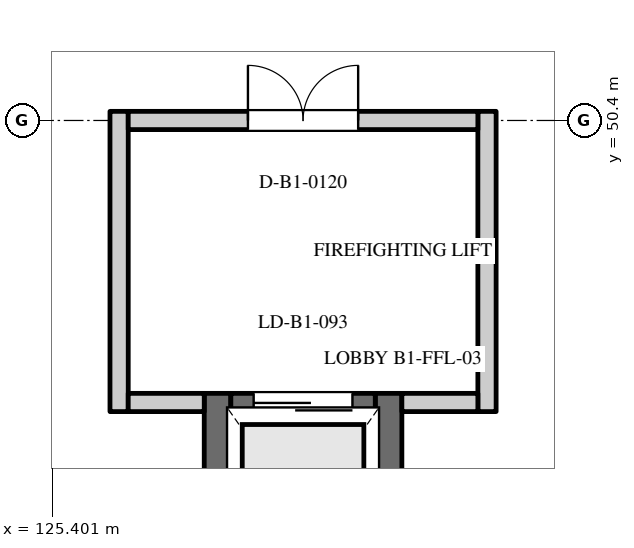
"""IFC4 building model, lengths in metres.
Left out: names, types, materials, properties, quantities, classifications, styles, units other than length and angle.
Written with IfcOpenShell. Run it as: python <this file> out.ifc"""

import sys

from ifc_helpers import new_model, si_unit, direction, frame, frame_2d, origin, place, context, subcontext, project, spatial, rectangle, extrude, element, fill, save


model = new_model("IFC4")
c1 = context("Model", 3, precision=1e-05, world=origin(), true_north=direction((0.0, 1.0)))
c2 = subcontext(c1, "Body", "Model", "MODEL_VIEW")
j1 = project(units=[si_unit("LENGTHUNIT", "METRE"), si_unit("PLANEANGLEUNIT", "RADIAN")], contexts=[c1])
p1 = place(None, origin())
s1 = spatial("IfcSite", under=j1, at=p1, CompositionType="ELEMENT")
p2 = place(p1, origin())
s2 = spatial("IfcBuilding", under=s1, at=p2, CompositionType="ELEMENT")
p3 = place(p2, frame((0.0, 0.0, -4.5)))
s3 = spatial("IfcBuildingStorey", under=s2, at=p3, CompositionType="ELEMENT", Elevation=-4.5)
for number, where, z_axis, x_axis in (
    (1, (127.575, 43.06, 0.0), (0.0, 0.0, 1.0), (0.0, 1.0, 0.0)),
    (2, (129.825, 43.06, 0.0), (0.0, 0.0, 1.0), (0.0, 1.0, 0.0)),
):
    element("IfcWall", number, at=place(p3, frame(where, z_axis=z_axis, x_axis=x_axis)), inside=s3, PredefinedType="SHEAR", context=c2, shape_type="SweptSolid", body=[
        extrude(rectangle(XDim=3.75, YDim=0.35, at=frame_2d((1.875, 0.0))), origin(), (0.0, 0.0, 1.0), 4.5),
    ])
p4 = place(p3, frame((127.75, 46.635, 0.0), z_axis=(0.0, 0.0, 1.0), x_axis=(1.0, 0.0, 0.0)))
e3 = element("IfcWall", 3, at=p4, inside=s3, PredefinedType="SHEAR", context=c2, shape_type="SweptSolid", body=[
    extrude(rectangle(XDim=1.9, YDim=0.35, at=frame_2d((0.95, 0.0))), origin(), (0.0, 0.0, 1.0), 4.15),
])
p5 = place(p4, frame((0.3, 0.0, 0.0)))
e4 = element("IfcOpeningElement", 4, at=p5, cuts=e3, PredefinedType="OPENING", context=c2, shape_type="SweptSolid", body=[
    extrude(rectangle(XDim=1.3, YDim=2.2, at=frame_2d((0.65, 1.1))), frame((0.0, 0.187, 0.0), z_axis=(0.0, -1.0, 0.0), x_axis=(1.0, 0.0, 0.0)), (0.0, 0.0, 1.0), 0.374),
])
for number, where, z_axis, x_axis in (
    (5, (126.28, 46.57, 0.0), (0.0, 0.0, 1.0), (0.0, 1.0, 0.0)),
    (6, (131.12, 46.57, 0.0), (0.0, 0.0, 1.0), (0.0, 1.0, 0.0)),
):
    element("IfcWall", number, at=place(p3, frame(where, z_axis=z_axis, x_axis=x_axis)), inside=s3, PredefinedType="STANDARD", context=c2, shape_type="SweptSolid", body=[
        extrude(rectangle(XDim=3.95, YDim=0.24, at=frame_2d((1.975, 0.0))), origin(), (0.0, 0.0, 1.0), 3.4),
    ])
for number, where, z_axis, x_axis in (
    (7, (126.4, 46.69, 0.0), (0.0, 0.0, 1.0), (1.0, 0.0, 0.0)),
    (8, (130.0, 46.69, 0.0), (0.0, 0.0, 1.0), (1.0, 0.0, 0.0)),
):
    element("IfcWall", number, at=place(p3, frame(where, z_axis=z_axis, x_axis=x_axis)), inside=s3, PredefinedType="STANDARD", context=c2, shape_type="SweptSolid", body=[
        extrude(rectangle(XDim=1.0, YDim=0.24, at=frame_2d((0.5, 0.0))), origin(), (0.0, 0.0, 1.0), 3.4),
    ])
p6 = place(p3, frame((126.4, 50.4, 0.0), z_axis=(0.0, 0.0, 1.0), x_axis=(1.0, 0.0, 0.0)))
e9 = element("IfcWall", 9, at=p6, inside=s3, PredefinedType="STANDARD", context=c2, shape_type="SweptSolid", body=[
    extrude(rectangle(XDim=4.6, YDim=0.24, at=frame_2d((2.3, 0.0))), origin(), (0.0, 0.0, 1.0), 3.4),
])
p7 = place(p6, frame((1.575, 0.0, 0.0)))
e10 = element("IfcOpeningElement", 10, at=p7, cuts=e9, PredefinedType="OPENING", context=c2, shape_type="SweptSolid", body=[
    extrude(rectangle(XDim=1.45, YDim=2.2, at=frame_2d((0.725, 1.1))), frame((0.0, 0.132, 0.0), z_axis=(0.0, -1.0, 0.0), x_axis=(1.0, 0.0, 0.0)), (0.0, 0.0, 1.0), 0.264),
])
p8 = place(p5, origin())
e11 = element("IfcDoor", 11, at=p8, inside=s3, OperationType="SLIDING_TO_LEFT", PredefinedType="DOOR", context=c2, shape_type="SweptSolid", body=[
    extrude(rectangle(XDim=1.3, YDim=2.2, at=frame_2d((0.65, 1.1))), frame((0.0, 0.025, 0.0), z_axis=(0.0, -1.0, 0.0), x_axis=(1.0, 0.0, 0.0)), (0.0, 0.0, 1.0), 0.05),
])
fill(e4, e11)
p9 = place(p7, origin())
e12 = element("IfcDoor", 12, at=p9, inside=s3, OperationType="DOUBLE_DOOR_SINGLE_SWING", PredefinedType="DOOR", context=c2, shape_type="SweptSolid", body=[
    extrude(rectangle(XDim=1.45, YDim=2.2, at=frame_2d((0.725, 1.1))), frame((0.0, 0.025, 0.0), z_axis=(0.0, -1.0, 0.0), x_axis=(1.0, 0.0, 0.0)), (0.0, 0.0, 1.0), 0.05),
])
fill(e10, e12)
save(model, sys.argv[1])
